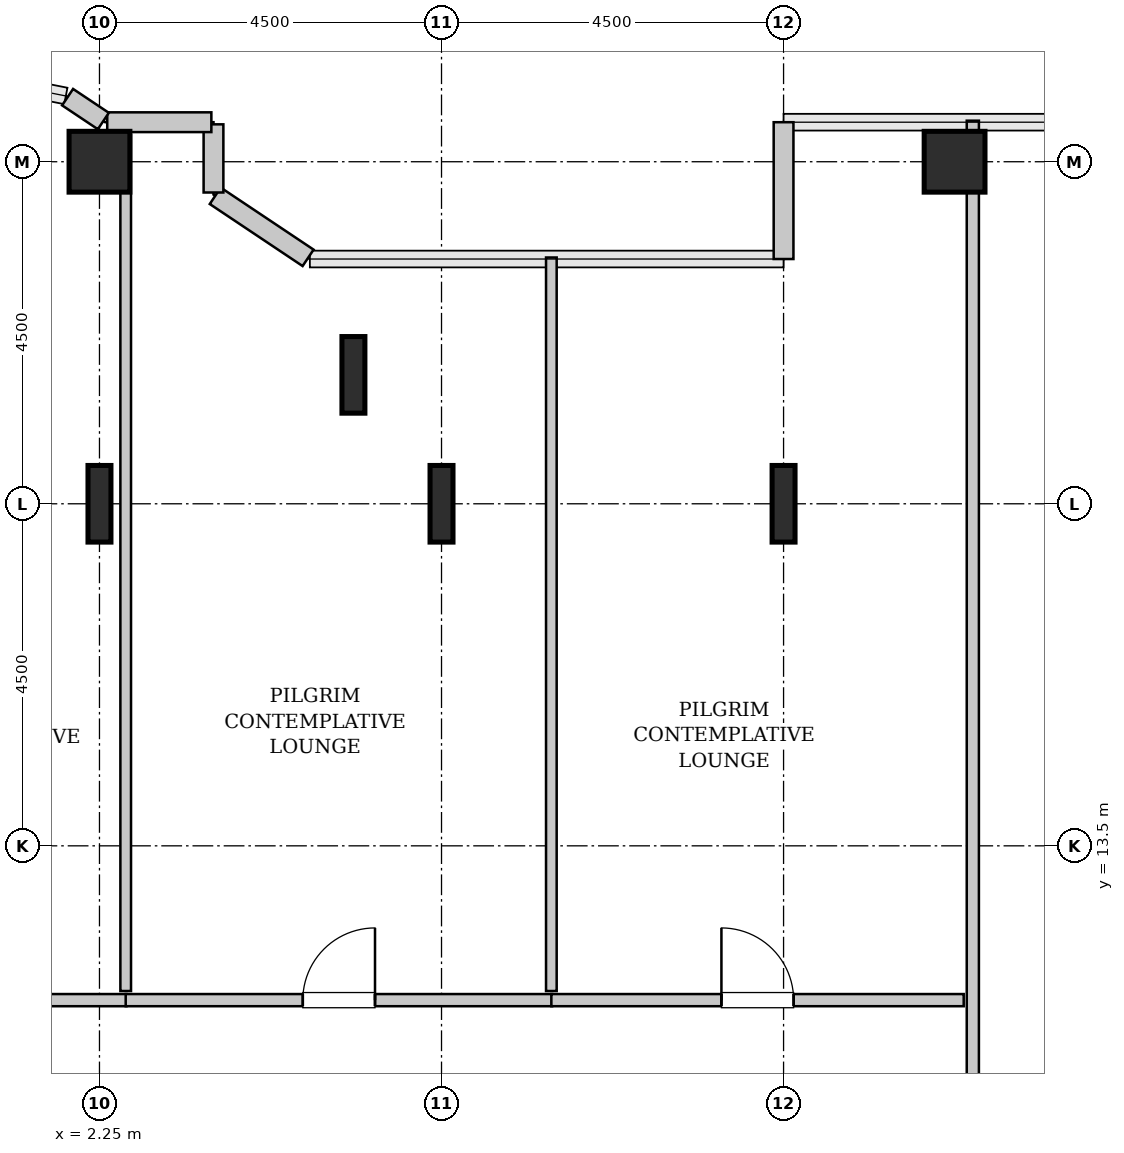
"""IFC4 building model, lengths in metres.
Left out: names, types, materials, properties, quantities, classifications, styles, units other than length and angle.
Written with IfcOpenShell. Run it as: python <this file> out.ifc"""

import sys

from ifc_helpers import new_model, si_unit, direction, frame, frame_2d, origin, origin_2d, place, context, subcontext, project, spatial, rectangle, hollow_rectangle, i_section, extrude, source, transform, mapped, element, fill, save


model = new_model("IFC4")
c1 = context("Model", 3, precision=1e-05, world=origin(), true_north=direction((0.0, 1.0)))
c2 = subcontext(c1, "Body", "Model", "MODEL_VIEW")
j1 = project(units=[si_unit("LENGTHUNIT", "METRE"), si_unit("PLANEANGLEUNIT", "RADIAN")], contexts=[c1])
p1 = place(None, origin())
s1 = spatial("IfcSite", under=j1, at=p1, CompositionType="ELEMENT")
p2 = place(p1, origin())
s2 = spatial("IfcBuilding", under=s1, at=p2, CompositionType="ELEMENT")
p3 = place(p2, frame((0.0, 0.0, 140.2)))
s3 = spatial("IfcBuildingStorey", under=s2, at=p3, CompositionType="ELEMENT", Elevation=140.2)
m1 = source(origin(), c2, "Body", "SweptSolid", [
    extrude(i_section(OverallWidth=0.302, OverallDepth=1.008, WebThickness=0.021, FlangeThickness=0.04, FilletRadius=0.03, at=origin_2d()), origin(), (0.0, 0.0, 1.0), 3.8),
])
p4 = place(p3, frame((2.25, 18.0, 0.0), z_axis=(0.0, 0.0, 1.0), x_axis=(1.0, 0.0, 0.0)))
e1 = element("IfcColumn", 1, at=p4, inside=s3, PredefinedType="COLUMN", context=c2, shape_type="MappedRepresentation", body=[
    mapped(m1, transform((0.0, 0.0, 0.0), x_axis=(1.0, 0.0, 0.0), y_axis=(0.0, 1.0, 0.0), z_axis=(0.0, 0.0, 1.0), scale=1.0)),
])
m2 = source(origin(), c2, "Body", "SweptSolid", [
    extrude(hollow_rectangle(XDim=0.8, YDim=0.8, WallThickness=0.04, InnerFilletRadius=0.04, OuterFilletRadius=0.08, at=origin_2d()), origin(), (0.0, 0.0, 1.0), 3.8),
])
p5 = place(p3, frame((2.25, 22.5, 0.0), z_axis=(0.0, 0.0, 1.0), x_axis=(1.0, 0.0, 0.0)))
e2 = element("IfcColumn", 2, at=p5, inside=s3, PredefinedType="COLUMN", context=c2, shape_type="MappedRepresentation", body=[
    mapped(m2, transform((0.0, 0.0, 0.0), x_axis=(1.0, 0.0, 0.0), y_axis=(0.0, 1.0, 0.0), z_axis=(0.0, 0.0, 1.0), scale=1.0)),
])
for number, where, z_axis, x_axis in (
    (3, (5.591, 19.696, 0.0), (0.0, 0.0, 1.0), (1.0, 0.0, 0.0)),
    (4, (6.75, 18.0, 0.0), (0.0, 0.0, 1.0), (1.0, 0.0, 0.0)),
    (5, (11.25, 18.0, 0.0), (0.0, 0.0, 1.0), (1.0, 0.0, 0.0)),
):
    element("IfcColumn", number, at=place(p3, frame(where, z_axis=z_axis, x_axis=x_axis)), inside=s3, PredefinedType="COLUMN", context=c2, shape_type="MappedRepresentation", body=[
        mapped(m1, transform((0.0, 0.0, 0.0), x_axis=(1.0, 0.0, 0.0), y_axis=(0.0, 1.0, 0.0), z_axis=(0.0, 0.0, 1.0), scale=1.0)),
    ])
p6 = place(p3, frame((13.5, 22.5, 0.0), z_axis=(0.0, 0.0, 1.0), x_axis=(1.0, 0.0, 0.0)))
e6 = element("IfcColumn", 6, at=p6, inside=s3, PredefinedType="COLUMN", context=c2, shape_type="MappedRepresentation", body=[
    mapped(m2, transform((0.0, 0.0, 0.0), x_axis=(1.0, 0.0, 0.0), y_axis=(0.0, 1.0, 0.0), z_axis=(0.0, 0.0, 1.0), scale=1.0)),
])
m3 = source(origin(), c2, "Body", "SweptSolid", [
    extrude(rectangle(XDim=1.8, YDim=0.26, at=frame_2d((0.9, 0.0))), origin(), (0.0, 0.0, 1.0), 3.5),
])
p7 = place(p3, frame((11.25, 23.02, 0.0), z_axis=(0.0, 0.0, 1.0), x_axis=(0.0, -1.0, 0.0)))
e7 = element("IfcWall", 7, at=p7, inside=s3, PredefinedType="SOLIDWALL", context=c2, shape_type="MappedRepresentation", body=[
    mapped(m3, transform((0.0, 0.0, 0.0), x_axis=(1.0, 0.0, 0.0), y_axis=(0.0, 1.0, 0.0), z_axis=(0.0, 0.0, 1.0), scale=1.0)),
])
m4 = source(origin(), c2, "Body", "SweptSolid", [
    extrude(rectangle(XDim=1.469, YDim=0.26, at=frame_2d((0.734, 0.0))), origin(), (0.0, 0.0, 1.0), 3.5),
])
p8 = place(p3, frame((4.995, 21.236, 0.0), z_axis=(0.0, 0.0, 1.0), x_axis=(-0.831461760506, 0.555581983884, 0.0)))
e8 = element("IfcWall", 8, at=p8, inside=s3, PredefinedType="SOLIDWALL", context=c2, shape_type="MappedRepresentation", body=[
    mapped(m4, transform((0.0, 0.0, 0.0), x_axis=(1.0, 0.0, 0.0), y_axis=(0.0, 1.0, 0.0), z_axis=(0.0, 0.0, 1.0), scale=1.0)),
])
m5 = source(origin(), c2, "Body", "SweptSolid", [
    extrude(rectangle(XDim=0.897, YDim=0.26, at=frame_2d((0.448, 0.0))), origin(), (0.0, 0.0, 1.0), 3.5),
])
p9 = place(p3, frame((3.75, 22.095, 0.0), z_axis=(0.0, 0.0, 1.0), x_axis=(0.0, 1.0, 0.0)))
e9 = element("IfcWall", 9, at=p9, inside=s3, PredefinedType="SOLIDWALL", context=c2, shape_type="MappedRepresentation", body=[
    mapped(m5, transform((0.0, 0.0, 0.0), x_axis=(1.0, 0.0, 0.0), y_axis=(0.0, 1.0, 0.0), z_axis=(0.0, 0.0, 1.0), scale=1.0)),
])
m6 = source(origin(), c2, "Body", "SweptSolid", [
    extrude(rectangle(XDim=1.37, YDim=0.26, at=frame_2d((0.685, 0.0))), origin(), (0.0, 0.0, 1.0), 3.5),
])
p10 = place(p3, frame((3.722, 23.02, 0.0), z_axis=(0.0, 0.0, 1.0), x_axis=(-1.0, 0.0, 0.0)))
e10 = element("IfcWall", 10, at=p10, inside=s3, PredefinedType="SOLIDWALL", context=c2, shape_type="MappedRepresentation", body=[
    mapped(m6, transform((0.0, 0.0, 0.0), x_axis=(1.0, 0.0, 0.0), y_axis=(0.0, 1.0, 0.0), z_axis=(0.0, 0.0, 1.0), scale=1.0)),
])
m7 = source(origin(), c2, "Body", "SweptSolid", [
    extrude(rectangle(XDim=0.565, YDim=0.26, at=frame_2d((0.283, 0.0))), origin(), (0.0, 0.0, 1.0), 3.5),
])
p11 = place(p3, frame((2.301, 23.036, 0.0), z_axis=(0.0, 0.0, 1.0), x_axis=(-0.831651492666, 0.555297933317, 0.0)))
e11 = element("IfcWall", 11, at=p11, inside=s3, PredefinedType="SOLIDWALL", context=c2, shape_type="MappedRepresentation", body=[
    mapped(m7, transform((0.0, 0.0, 0.0), x_axis=(1.0, 0.0, 0.0), y_axis=(0.0, 1.0, 0.0), z_axis=(0.0, 0.0, 1.0), scale=1.0)),
])
m8 = source(origin(), c2, "Body", "SweptSolid", [
    extrude(rectangle(XDim=14.545, YDim=0.16, at=frame_2d((7.272, 0.0))), origin(), (0.0, 0.0, 1.0), 3.485),
])
p12 = place(p3, frame((13.74, 8.495, 0.0), z_axis=(0.0, 0.0, 1.0), x_axis=(0.0, 1.0, 0.0)))
e12 = element("IfcWall", 12, at=p12, inside=s3, PredefinedType="PARTITIONING", context=c2, shape_type="MappedRepresentation", body=[
    mapped(m8, transform((0.0, 0.0, 0.0), x_axis=(1.0, 0.0, 0.0), y_axis=(0.0, 1.0, 0.0), z_axis=(0.0, 0.0, 1.0), scale=1.0)),
])
p13 = place(p12, frame((1.032, 0.0, 0.0)))
e13 = element("IfcOpeningElement", 13, at=p13, cuts=e12, PredefinedType="OPENING", context=c2, shape_type="SweptSolid", body=[
    extrude(rectangle(XDim=0.95, YDim=2.1, at=frame_2d((0.475, 1.05))), frame((0.0, 0.09, 0.0), z_axis=(0.0, -1.0, 0.0), x_axis=(1.0, 0.0, 0.0)), (0.0, 0.0, 1.0), 0.18),
])
m9 = source(origin(), c2, "Body", "SweptSolid", [
    extrude(rectangle(XDim=3.505, YDim=0.16, at=frame_2d((1.752, 0.0))), origin(), (0.0, 0.0, 1.0), 3.485),
])
p14 = place(p3, frame((-0.9, 11.47, 0.0), z_axis=(0.0, 0.0, 1.0), x_axis=(1.0, 0.0, 0.0)))
e14 = element("IfcWall", 14, at=p14, inside=s3, PredefinedType="PARTITIONING", context=c2, shape_type="MappedRepresentation", body=[
    mapped(m9, transform((0.0, 0.0, 0.0), x_axis=(1.0, 0.0, 0.0), y_axis=(0.0, 1.0, 0.0), z_axis=(0.0, 0.0, 1.0), scale=1.0)),
])
p15 = place(p14, frame((1.278, 0.0, 0.0)))
e15 = element("IfcOpeningElement", 15, at=p15, cuts=e14, PredefinedType="OPENING", context=c2, shape_type="SweptSolid", body=[
    extrude(rectangle(XDim=0.95, YDim=2.1, at=frame_2d((0.475, 1.05))), frame((0.0, 0.09, 0.0), z_axis=(0.0, -1.0, 0.0), x_axis=(1.0, 0.0, 0.0)), (0.0, 0.0, 1.0), 0.18),
])
m10 = source(origin(), c2, "Body", "SweptSolid", [
    extrude(rectangle(XDim=11.26, YDim=0.14, at=frame_2d((5.63, 0.0))), origin(), (0.0, 0.0, 1.0), 2.825),
])
p16 = place(p3, frame((2.595, 11.59, 0.0), z_axis=(0.0, 0.0, 1.0), x_axis=(0.0, 1.0, 0.0)))
e16 = element("IfcWall", 16, at=p16, inside=s3, PredefinedType="PARTITIONING", context=c2, shape_type="MappedRepresentation", body=[
    mapped(m10, transform((0.0, 0.0, 0.0), x_axis=(1.0, 0.0, 0.0), y_axis=(0.0, 1.0, 0.0), z_axis=(0.0, 0.0, 1.0), scale=1.0)),
])
m11 = source(origin(), c2, "Body", "SweptSolid", [
    extrude(rectangle(XDim=5.61, YDim=0.16, at=frame_2d((2.805, 0.0))), origin(), (0.0, 0.0, 1.0), 3.485),
])
p17 = place(p3, frame((2.595, 11.47, 0.0), z_axis=(0.0, 0.0, 1.0), x_axis=(1.0, 0.0, 0.0)))
e17 = element("IfcWall", 17, at=p17, inside=s3, PredefinedType="PARTITIONING", context=c2, shape_type="MappedRepresentation", body=[
    mapped(m11, transform((0.0, 0.0, 0.0), x_axis=(1.0, 0.0, 0.0), y_axis=(0.0, 1.0, 0.0), z_axis=(0.0, 0.0, 1.0), scale=1.0)),
])
p18 = place(p17, frame((2.33, 0.0, 0.0)))
e18 = element("IfcOpeningElement", 18, at=p18, cuts=e17, PredefinedType="OPENING", context=c2, shape_type="SweptSolid", body=[
    extrude(rectangle(XDim=0.95, YDim=2.1, at=frame_2d((0.475, 1.05))), frame((0.0, 0.09, 0.0), z_axis=(0.0, -1.0, 0.0), x_axis=(1.0, 0.0, 0.0)), (0.0, 0.0, 1.0), 0.18),
])
m12 = source(origin(), c2, "Body", "SweptSolid", [
    extrude(rectangle(XDim=9.65, YDim=0.14, at=frame_2d((4.825, 0.0))), origin(), (0.0, 0.0, 1.0), 3.485),
])
p19 = place(p3, frame((8.195, 11.59, 0.0), z_axis=(0.0, 0.0, 1.0), x_axis=(0.0, 1.0, 0.0)))
e19 = element("IfcWall", 19, at=p19, inside=s3, PredefinedType="PARTITIONING", context=c2, shape_type="MappedRepresentation", body=[
    mapped(m12, transform((0.0, 0.0, 0.0), x_axis=(1.0, 0.0, 0.0), y_axis=(0.0, 1.0, 0.0), z_axis=(0.0, 0.0, 1.0), scale=1.0)),
])
m13 = source(origin(), c2, "Body", "SweptSolid", [
    extrude(rectangle(XDim=5.425, YDim=0.16, at=frame_2d((2.712, 0.0))), origin(), (0.0, 0.0, 1.0), 3.485),
])
p20 = place(p3, frame((8.195, 11.47, 0.0), z_axis=(0.0, 0.0, 1.0), x_axis=(1.0, 0.0, 0.0)))
e20 = element("IfcWall", 20, at=p20, inside=s3, PredefinedType="PARTITIONING", context=c2, shape_type="MappedRepresentation", body=[
    mapped(m13, transform((0.0, 0.0, 0.0), x_axis=(1.0, 0.0, 0.0), y_axis=(0.0, 1.0, 0.0), z_axis=(0.0, 0.0, 1.0), scale=1.0)),
])
p21 = place(p20, frame((2.238, 0.0, 0.0)))
e21 = element("IfcOpeningElement", 21, at=p21, cuts=e20, PredefinedType="OPENING", context=c2, shape_type="SweptSolid", body=[
    extrude(rectangle(XDim=0.95, YDim=2.1, at=frame_2d((0.475, 1.05))), frame((0.0, 0.09, 0.0), z_axis=(0.0, -1.0, 0.0), x_axis=(1.0, 0.0, 0.0)), (0.0, 0.0, 1.0), 0.18),
])
m14 = source(origin(), c2, "Body", "SweptSolid", [
    extrude(rectangle(XDim=0.95, YDim=2.1, at=frame_2d((0.475, 1.05))), frame((0.0, 0.025, 0.0), z_axis=(0.0, -1.0, 0.0), x_axis=(1.0, 0.0, 0.0)), (0.0, 0.0, 1.0), 0.05),
])
p22 = place(p18, origin())
e22 = element("IfcDoor", 22, at=p22, inside=s3, OperationType="SINGLE_SWING_RIGHT", PredefinedType="DOOR", context=c2, shape_type="MappedRepresentation", body=[
    mapped(m14, transform((0.0, 0.0, 0.0), x_axis=(1.0, 0.0, 0.0), y_axis=(0.0, 1.0, 0.0), z_axis=(0.0, 0.0, 1.0), scale=1.0)),
])
fill(e18, e22)
p23 = place(p21, origin())
e23 = element("IfcDoor", 23, at=p23, inside=s3, OperationType="SINGLE_SWING_LEFT", PredefinedType="DOOR", context=c2, shape_type="MappedRepresentation", body=[
    mapped(m14, transform((0.0, 0.0, 0.0), x_axis=(1.0, 0.0, 0.0), y_axis=(0.0, 1.0, 0.0), z_axis=(0.0, 0.0, 1.0), scale=1.0)),
])
fill(e21, e23)
save(model, sys.argv[1])
